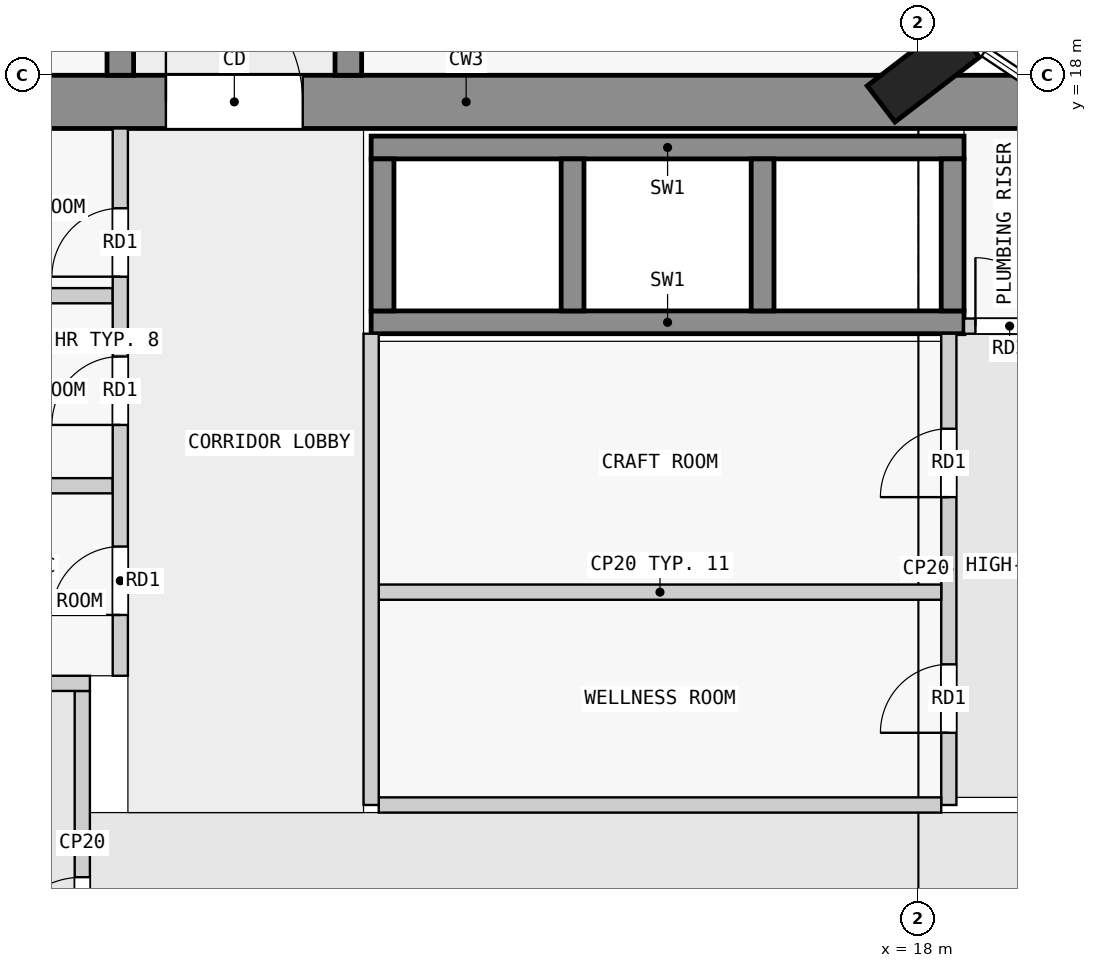
"""IFC4 building model, lengths in metres.
Left out: names, types, materials, properties, quantities, classifications, styles, units other than length and angle.
Written with IfcOpenShell. Run it as: python <this file> out.ifc"""

import sys

from ifc_helpers import new_model, si_unit, direction, frame, frame_2d, origin, origin_2d, place, context, subcontext, project, spatial, rectangle, extrude, element, fill, save


model = new_model("IFC4")
c1 = context("Model", 3, precision=1e-05, world=origin(), true_north=direction((0.0, 1.0)))
c2 = subcontext(c1, "Body", "Model", "MODEL_VIEW")
j1 = project(units=[si_unit("LENGTHUNIT", "METRE"), si_unit("PLANEANGLEUNIT", "RADIAN")], contexts=[c1])
p1 = place(None, origin())
s1 = spatial("IfcSite", under=j1, at=p1, CompositionType="ELEMENT")
p2 = place(p1, origin())
s2 = spatial("IfcBuilding", under=s1, at=p2, CompositionType="ELEMENT")
p3 = place(p2, frame((0.0, 0.0, 65.3)))
s3 = spatial("IfcBuildingStorey", under=s2, at=p3, CompositionType="ELEMENT", Elevation=65.3)
p4 = place(p3, frame((18.065, 18.05, 0.0), z_axis=(0.0, 0.0, 1.0), x_axis=(-0.608810846443, 0.793315418515, 0.0)))
e1 = element("IfcColumn", 1, at=p4, inside=s3, PredefinedType="COLUMN", context=c2, shape_type="SweptSolid", body=[
    extrude(rectangle(XDim=0.6, YDim=1.4, at=origin_2d()), origin(), (0.0, 0.0, 1.0), 3.5),
])
p5 = place(p3, frame((1.6, 17.65, 0.0), z_axis=(0.0, 0.0, 1.0), x_axis=(1.0, 0.0, 0.0)))
e2 = element("IfcWall", 2, at=p5, inside=s3, PredefinedType="SHEAR", context=c2, shape_type="SweptSolid", body=[
    extrude(rectangle(XDim=20.9, YDim=0.7, at=frame_2d((10.45, 0.0))), origin(), (0.0, 0.0, 1.0), 3.25),
])
p6 = place(p5, frame((6.5, 0.0, 0.0)))
e3 = element("IfcOpeningElement", 3, at=p6, cuts=e2, PredefinedType="OPENING", context=c2, shape_type="SweptSolid", body=[
    extrude(rectangle(XDim=1.8, YDim=2.1, at=frame_2d((0.9, 1.05))), frame((0.0, 0.36, 0.0), z_axis=(0.0, -1.0, 0.0), x_axis=(1.0, 0.0, 0.0)), (0.0, 0.0, 1.0), 0.72),
])
for number, where, z_axis, x_axis in (
    (4, (10.8, 17.05, 0.0), (0.0, 0.0, 1.0), (1.0, 0.0, 0.0)),
    (5, (10.8, 14.75, 0.0), (0.0, 0.0, 1.0), (1.0, 0.0, 0.0)),
):
    element("IfcWall", number, at=place(p3, frame(where, z_axis=z_axis, x_axis=x_axis)), inside=s3, PredefinedType="SHEAR", context=c2, shape_type="SweptSolid", body=[
        extrude(rectangle(XDim=7.8, YDim=0.3, at=frame_2d((3.9, 0.0))), origin(), (0.0, 0.0, 1.0), 3.25),
    ])
for number, where, z_axis, x_axis in (
    (6, (10.95, 14.9, 0.0), (0.0, 0.0, 1.0), (0.0, 1.0, 0.0)),
    (7, (13.45, 14.9, 0.0), (0.0, 0.0, 1.0), (0.0, 1.0, 0.0)),
    (8, (15.95, 14.9, 0.0), (0.0, 0.0, 1.0), (0.0, 1.0, 0.0)),
    (9, (18.45, 14.9, 0.0), (0.0, 0.0, 1.0), (0.0, 1.0, 0.0)),
):
    element("IfcWall", number, at=place(p3, frame(where, z_axis=z_axis, x_axis=x_axis)), inside=s3, PredefinedType="SHEAR", context=c2, shape_type="SweptSolid", body=[
        extrude(rectangle(XDim=2.0, YDim=0.3, at=frame_2d((1.0, 0.0))), origin(), (0.0, 0.0, 1.0), 3.25),
    ])
p7 = place(p3, frame((7.5, 18.0, 0.0), z_axis=(0.0, 0.0, 1.0), x_axis=(0.0, 1.0, 0.0)))
e10 = element("IfcWall", 10, at=p7, inside=s3, PredefinedType="SHEAR", context=c2, shape_type="SweptSolid", body=[
    extrude(rectangle(XDim=27.0, YDim=0.35, at=frame_2d((13.5, 0.0))), origin(), (0.0, 0.0, 1.0), 3.25),
])
p8 = place(p7, frame((1.75, 0.0, 0.0)))
e11 = element("IfcOpeningElement", 11, at=p8, cuts=e10, PredefinedType="OPENING", context=c2, shape_type="SweptSolid", body=[
    extrude(rectangle(XDim=1.0, YDim=2.1, at=frame_2d((0.5, 1.05))), frame((0.0, 0.185, 0.0), z_axis=(0.0, -1.0, 0.0), x_axis=(1.0, 0.0, 0.0)), (0.0, 0.0, 1.0), 0.37),
])
p9 = place(p7, frame((6.25, 0.0, 0.0)))
e12 = element("IfcOpeningElement", 12, at=p9, cuts=e10, PredefinedType="OPENING", context=c2, shape_type="SweptSolid", body=[
    extrude(rectangle(XDim=1.0, YDim=2.1, at=frame_2d((0.5, 1.05))), frame((0.0, 0.185, 0.0), z_axis=(0.0, -1.0, 0.0), x_axis=(1.0, 0.0, 0.0)), (0.0, 0.0, 1.0), 0.37),
])
p10 = place(p7, frame((10.75, 0.0, 0.0)))
e13 = element("IfcOpeningElement", 13, at=p10, cuts=e10, PredefinedType="OPENING", context=c2, shape_type="SweptSolid", body=[
    extrude(rectangle(XDim=1.0, YDim=2.1, at=frame_2d((0.5, 1.05))), frame((0.0, 0.185, 0.0), z_axis=(0.0, -1.0, 0.0), x_axis=(1.0, 0.0, 0.0)), (0.0, 0.0, 1.0), 0.37),
])
p11 = place(p7, frame((17.55, 0.0, 0.0)))
e14 = element("IfcOpeningElement", 14, at=p11, cuts=e10, PredefinedType="OPENING", context=c2, shape_type="SweptSolid", body=[
    extrude(rectangle(XDim=1.0, YDim=2.1, at=frame_2d((0.5, 1.05))), frame((0.0, 0.185, 0.0), z_axis=(0.0, -1.0, 0.0), x_axis=(1.0, 0.0, 0.0)), (0.0, 0.0, 1.0), 0.37),
])
p12 = place(p7, frame((23.25, 0.0, 0.0)))
e15 = element("IfcOpeningElement", 15, at=p12, cuts=e10, PredefinedType="OPENING", context=c2, shape_type="SweptSolid", body=[
    extrude(rectangle(XDim=0.9, YDim=2.1, at=frame_2d((0.45, 1.05))), frame((0.0, 0.185, 0.0), z_axis=(0.0, -1.0, 0.0), x_axis=(1.0, 0.0, 0.0)), (0.0, 0.0, 1.0), 0.37),
])
p13 = place(p7, frame((25.45, 0.0, 0.0)))
e16 = element("IfcOpeningElement", 16, at=p13, cuts=e10, PredefinedType="OPENING", context=c2, shape_type="SweptSolid", body=[
    extrude(rectangle(XDim=1.0, YDim=2.1, at=frame_2d((0.5, 1.05))), frame((0.0, 0.185, 0.0), z_axis=(0.0, -1.0, 0.0), x_axis=(1.0, 0.0, 0.0)), (0.0, 0.0, 1.0), 0.37),
])
p14 = place(p3, frame((10.5, 18.0, 0.0), z_axis=(0.0, 0.0, 1.0), x_axis=(0.0, 1.0, 0.0)))
e17 = element("IfcWall", 17, at=p14, inside=s3, PredefinedType="SHEAR", context=c2, shape_type="SweptSolid", body=[
    extrude(rectangle(XDim=27.0, YDim=0.35, at=frame_2d((13.5, 0.0))), origin(), (0.0, 0.0, 1.0), 3.25),
])
p15 = place(p14, frame((4.05, 0.0, 0.0)))
e18 = element("IfcOpeningElement", 18, at=p15, cuts=e17, PredefinedType="OPENING", context=c2, shape_type="SweptSolid", body=[
    extrude(rectangle(XDim=1.0, YDim=2.1, at=frame_2d((0.5, 1.05))), frame((0.0, 0.185, 0.0), z_axis=(0.0, -1.0, 0.0), x_axis=(1.0, 0.0, 0.0)), (0.0, 0.0, 1.0), 0.37),
])
p16 = place(p14, frame((13.05, 0.0, 0.0)))
e19 = element("IfcOpeningElement", 19, at=p16, cuts=e17, PredefinedType="OPENING", context=c2, shape_type="SweptSolid", body=[
    extrude(rectangle(XDim=1.0, YDim=2.1, at=frame_2d((0.5, 1.05))), frame((0.0, 0.185, 0.0), z_axis=(0.0, -1.0, 0.0), x_axis=(1.0, 0.0, 0.0)), (0.0, 0.0, 1.0), 0.37),
])
p17 = place(p14, frame((21.35, 0.0, 0.0)))
e20 = element("IfcOpeningElement", 20, at=p17, cuts=e17, PredefinedType="OPENING", context=c2, shape_type="SweptSolid", body=[
    extrude(rectangle(XDim=1.0, YDim=2.1, at=frame_2d((0.5, 1.05))), frame((0.0, 0.185, 0.0), z_axis=(0.0, -1.0, 0.0), x_axis=(1.0, 0.0, 0.0)), (0.0, 0.0, 1.0), 0.37),
])
p18 = place(p3, frame((7.0, 5.9, 0.0), z_axis=(0.0, 0.0, 1.0), x_axis=(0.0, 1.0, 0.0)))
e21 = element("IfcWall", 21, at=p18, inside=s3, PredefinedType="PARTITIONING", context=c2, shape_type="SweptSolid", body=[
    extrude(rectangle(XDim=4.0, YDim=0.2, at=frame_2d((2.0, 0.0))), origin(), (0.0, 0.0, 1.0), 3.25),
])
p19 = place(p18, frame((0.45, 0.0, 0.0)))
e22 = element("IfcOpeningElement", 22, at=p19, cuts=e21, PredefinedType="OPENING", context=c2, shape_type="SweptSolid", body=[
    extrude(rectangle(XDim=1.1, YDim=2.1, at=frame_2d((0.55, 1.05))), frame((0.0, 0.11, 0.0), z_axis=(0.0, -1.0, 0.0), x_axis=(1.0, 0.0, 0.0)), (0.0, 0.0, 1.0), 0.22),
])
p20 = place(p3, frame((5.15, 10.0, 0.0), z_axis=(0.0, 0.0, 1.0), x_axis=(1.0, 0.0, 0.0)))
e23 = element("IfcWall", 23, at=p20, inside=s3, PredefinedType="PARTITIONING", context=c2, shape_type="SweptSolid", body=[
    extrude(rectangle(XDim=1.95, YDim=0.2, at=frame_2d((0.975, 0.0))), origin(), (0.0, 0.0, 1.0), 3.25),
])
p21 = place(p3, frame((10.8, 8.4, 0.0), z_axis=(0.0, 0.0, 1.0), x_axis=(0.0, 1.0, 0.0)))
e24 = element("IfcWall", 24, at=p21, inside=s3, PredefinedType="PARTITIONING", context=c2, shape_type="SweptSolid", body=[
    extrude(rectangle(XDim=6.2, YDim=0.2, at=frame_2d((3.1, 0.0))), origin(), (0.0, 0.0, 1.0), 3.25),
])
p22 = place(p3, frame((10.9, 8.4, 0.0), z_axis=(0.0, 0.0, 1.0), x_axis=(1.0, 0.0, 0.0)))
e25 = element("IfcWall", 25, at=p22, inside=s3, PredefinedType="PARTITIONING", context=c2, shape_type="SweptSolid", body=[
    extrude(rectangle(XDim=7.4, YDim=0.2, at=frame_2d((3.7, 0.0))), origin(), (0.0, 0.0, 1.0), 3.25),
])
p23 = place(p3, frame((18.4, 8.4, 0.0), z_axis=(0.0, 0.0, 1.0), x_axis=(0.0, 1.0, 0.0)))
e26 = element("IfcWall", 26, at=p23, inside=s3, PredefinedType="PARTITIONING", context=c2, shape_type="SweptSolid", body=[
    extrude(rectangle(XDim=6.2, YDim=0.2, at=frame_2d((3.1, 0.0))), origin(), (0.0, 0.0, 1.0), 3.25),
])
p24 = place(p23, frame((0.95, 0.0, 0.0)))
e27 = element("IfcOpeningElement", 27, at=p24, cuts=e26, PredefinedType="OPENING", context=c2, shape_type="SweptSolid", body=[
    extrude(rectangle(XDim=0.9, YDim=2.1, at=frame_2d((0.45, 1.05))), frame((0.0, 0.11, 0.0), z_axis=(0.0, -1.0, 0.0), x_axis=(1.0, 0.0, 0.0)), (0.0, 0.0, 1.0), 0.22),
])
p25 = place(p23, frame((4.05, 0.0, 0.0)))
e28 = element("IfcOpeningElement", 28, at=p25, cuts=e26, PredefinedType="OPENING", context=c2, shape_type="SweptSolid", body=[
    extrude(rectangle(XDim=0.9, YDim=2.1, at=frame_2d((0.45, 1.05))), frame((0.0, 0.11, 0.0), z_axis=(0.0, -1.0, 0.0), x_axis=(1.0, 0.0, 0.0)), (0.0, 0.0, 1.0), 0.22),
])
p26 = place(p3, frame((10.9, 11.2, 0.0), z_axis=(0.0, 0.0, 1.0), x_axis=(1.0, 0.0, 0.0)))
e29 = element("IfcWall", 29, at=p26, inside=s3, PredefinedType="PARTITIONING", context=c2, shape_type="SweptSolid", body=[
    extrude(rectangle(XDim=7.4, YDim=0.2, at=frame_2d((3.7, 0.0))), origin(), (0.0, 0.0, 1.0), 3.25),
])
p27 = place(p3, frame((7.5, 10.1, 0.0), z_axis=(0.0, 0.0, 1.0), x_axis=(0.0, 1.0, 0.0)))
e30 = element("IfcWall", 30, at=p27, inside=s3, PredefinedType="PARTITIONING", context=c2, shape_type="SweptSolid", body=[
    extrude(rectangle(XDim=7.2, YDim=0.2, at=frame_2d((3.6, 0.0))), origin(), (0.0, 0.0, 1.0), 3.25),
])
p28 = place(p27, frame((0.8, 0.0, 0.0)))
e31 = element("IfcOpeningElement", 31, at=p28, cuts=e30, PredefinedType="OPENING", context=c2, shape_type="SweptSolid", body=[
    extrude(rectangle(XDim=0.9, YDim=2.1, at=frame_2d((0.45, 1.05))), frame((0.0, 0.11, 0.0), z_axis=(0.0, -1.0, 0.0), x_axis=(1.0, 0.0, 0.0)), (0.0, 0.0, 1.0), 0.22),
])
p29 = place(p27, frame((3.3, 0.0, 0.0)))
e32 = element("IfcOpeningElement", 32, at=p29, cuts=e30, PredefinedType="OPENING", context=c2, shape_type="SweptSolid", body=[
    extrude(rectangle(XDim=0.9, YDim=2.1, at=frame_2d((0.45, 1.05))), frame((0.0, 0.11, 0.0), z_axis=(0.0, -1.0, 0.0), x_axis=(1.0, 0.0, 0.0)), (0.0, 0.0, 1.0), 0.22),
])
p30 = place(p27, frame((5.25, 0.0, 0.0)))
e33 = element("IfcOpeningElement", 33, at=p30, cuts=e30, PredefinedType="OPENING", context=c2, shape_type="SweptSolid", body=[
    extrude(rectangle(XDim=0.9, YDim=2.1, at=frame_2d((0.45, 1.05))), frame((0.0, 0.11, 0.0), z_axis=(0.0, -1.0, 0.0), x_axis=(1.0, 0.0, 0.0)), (0.0, 0.0, 1.0), 0.22),
])
for number, where, z_axis, x_axis in (
    (34, (5.15, 12.6, 0.0), (0.0, 0.0, 1.0), (1.0, 0.0, 0.0)),
    (35, (5.15, 15.1, 0.0), (0.0, 0.0, 1.0), (1.0, 0.0, 0.0)),
):
    element("IfcWall", number, at=place(p3, frame(where, z_axis=z_axis, x_axis=x_axis)), inside=s3, PredefinedType="PARTITIONING", context=c2, shape_type="SweptSolid", body=[
        extrude(rectangle(XDim=2.25, YDim=0.2, at=frame_2d((1.125, 0.0))), origin(), (0.0, 0.0, 1.0), 3.25),
    ])
p31 = place(p3, frame((18.6, 14.7, 0.0), z_axis=(0.0, 0.0, 1.0), x_axis=(1.0, 0.0, 0.0)))
e36 = element("IfcWall", 36, at=p31, inside=s3, PredefinedType="PARTITIONING", context=c2, shape_type="SweptSolid", body=[
    extrude(rectangle(XDim=3.2, YDim=0.2, at=frame_2d((1.6, 0.0))), origin(), (0.0, 0.0, 1.0), 3.25),
])
p32 = place(p31, frame((0.15, 0.0, 0.0)))
e37 = element("IfcOpeningElement", 37, at=p32, cuts=e36, PredefinedType="OPENING", context=c2, shape_type="SweptSolid", body=[
    extrude(rectangle(XDim=0.9, YDim=2.1, at=frame_2d((0.45, 1.05))), frame((0.0, 0.11, 0.0), z_axis=(0.0, -1.0, 0.0), x_axis=(1.0, 0.0, 0.0)), (0.0, 0.0, 1.0), 0.22),
])
p33 = place(p31, frame((1.75, 0.0, 0.0)))
e38 = element("IfcOpeningElement", 38, at=p33, cuts=e36, PredefinedType="OPENING", context=c2, shape_type="SweptSolid", body=[
    extrude(rectangle(XDim=0.9, YDim=2.1, at=frame_2d((0.45, 1.05))), frame((0.0, 0.11, 0.0), z_axis=(0.0, -1.0, 0.0), x_axis=(1.0, 0.0, 0.0)), (0.0, 0.0, 1.0), 0.22),
])
p34 = place(p19, origin())
e39 = element("IfcDoor", 39, at=p34, inside=s3, OperationType="SINGLE_SWING_LEFT", PredefinedType="DOOR", context=c2, shape_type="SweptSolid", body=[
    extrude(rectangle(XDim=1.1, YDim=2.1, at=frame_2d((0.55, 1.05))), frame((0.0, 0.025, 0.0), z_axis=(0.0, -1.0, 0.0), x_axis=(1.0, 0.0, 0.0)), (0.0, 0.0, 1.0), 0.05),
])
fill(e22, e39)
p35 = place(p24, origin())
e40 = element("IfcDoor", 40, at=p35, inside=s3, OperationType="SINGLE_SWING_LEFT", PredefinedType="DOOR", context=c2, shape_type="SweptSolid", body=[
    extrude(rectangle(XDim=0.9, YDim=2.1, at=frame_2d((0.45, 1.05))), frame((0.0, 0.025, 0.0), z_axis=(0.0, -1.0, 0.0), x_axis=(1.0, 0.0, 0.0)), (0.0, 0.0, 1.0), 0.05),
])
fill(e27, e40)
p36 = place(p25, origin())
e41 = element("IfcDoor", 41, at=p36, inside=s3, OperationType="SINGLE_SWING_LEFT", PredefinedType="DOOR", context=c2, shape_type="SweptSolid", body=[
    extrude(rectangle(XDim=0.9, YDim=2.1, at=frame_2d((0.45, 1.05))), frame((0.0, 0.025, 0.0), z_axis=(0.0, -1.0, 0.0), x_axis=(1.0, 0.0, 0.0)), (0.0, 0.0, 1.0), 0.05),
])
fill(e28, e41)
p37 = place(p6, origin())
e42 = element("IfcDoor", 42, at=p37, inside=s3, OperationType="DOUBLE_DOOR_SINGLE_SWING", PredefinedType="DOOR", context=c2, shape_type="SweptSolid", body=[
    extrude(rectangle(XDim=1.8, YDim=2.1, at=frame_2d((0.9, 1.05))), frame((0.0, 0.025, 0.0), z_axis=(0.0, -1.0, 0.0), x_axis=(1.0, 0.0, 0.0)), (0.0, 0.0, 1.0), 0.05),
])
fill(e3, e42)
p38 = place(p28, origin())
e43 = element("IfcDoor", 43, at=p38, inside=s3, OperationType="SINGLE_SWING_RIGHT", PredefinedType="DOOR", context=c2, shape_type="SweptSolid", body=[
    extrude(rectangle(XDim=0.9, YDim=2.1, at=frame_2d((0.45, 1.05))), frame((0.0, 0.025, 0.0), z_axis=(0.0, -1.0, 0.0), x_axis=(1.0, 0.0, 0.0)), (0.0, 0.0, 1.0), 0.05),
])
fill(e31, e43)
p39 = place(p29, origin())
e44 = element("IfcDoor", 44, at=p39, inside=s3, OperationType="SINGLE_SWING_RIGHT", PredefinedType="DOOR", context=c2, shape_type="SweptSolid", body=[
    extrude(rectangle(XDim=0.9, YDim=2.1, at=frame_2d((0.45, 1.05))), frame((0.0, 0.025, 0.0), z_axis=(0.0, -1.0, 0.0), x_axis=(1.0, 0.0, 0.0)), (0.0, 0.0, 1.0), 0.05),
])
fill(e32, e44)
p40 = place(p30, origin())
e45 = element("IfcDoor", 45, at=p40, inside=s3, OperationType="SINGLE_SWING_RIGHT", PredefinedType="DOOR", context=c2, shape_type="SweptSolid", body=[
    extrude(rectangle(XDim=0.9, YDim=2.1, at=frame_2d((0.45, 1.05))), frame((0.0, 0.025, 0.0), z_axis=(0.0, -1.0, 0.0), x_axis=(1.0, 0.0, 0.0)), (0.0, 0.0, 1.0), 0.05),
])
fill(e33, e45)
p41 = place(p32, origin())
e46 = element("IfcDoor", 46, at=p41, inside=s3, OperationType="SINGLE_SWING_LEFT", PredefinedType="DOOR", context=c2, shape_type="SweptSolid", body=[
    extrude(rectangle(XDim=0.9, YDim=2.1, at=frame_2d((0.45, 1.05))), frame((0.0, 0.025, 0.0), z_axis=(0.0, -1.0, 0.0), x_axis=(1.0, 0.0, 0.0)), (0.0, 0.0, 1.0), 0.05),
])
fill(e37, e46)
save(model, sys.argv[1])
